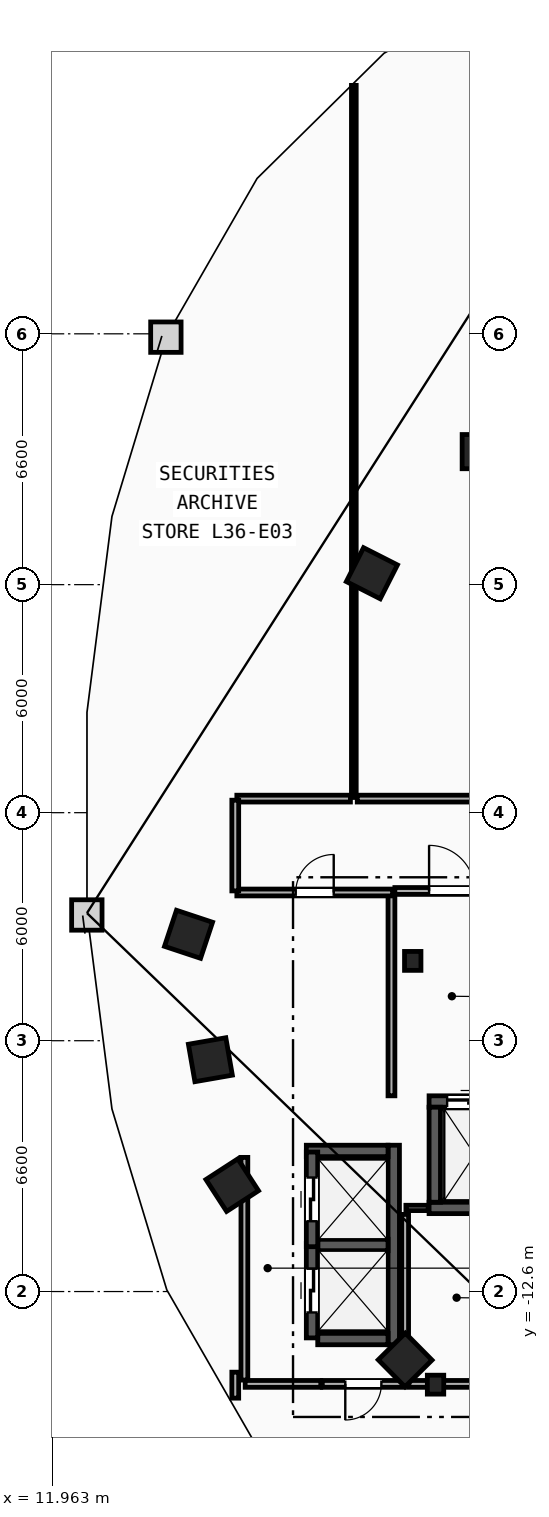
"""IFC4 building model, lengths in metres.
Left out: names, types, materials, properties, quantities, classifications, styles, units other than length and angle.
Written with IfcOpenShell. Run it as: python <this file> out.ifc"""

import sys

from ifc_helpers import new_model, si_unit, direction, frame, frame_2d, origin, origin_2d, place, context, subcontext, project, spatial, rectangle, i_section, extrude, element, fill, save


model = new_model("IFC4")
c1 = context("Model", 3, precision=1e-05, world=origin(), true_north=direction((0.0, 1.0)))
c2 = subcontext(c1, "Body", "Model", "MODEL_VIEW")
j1 = project(units=[si_unit("LENGTHUNIT", "METRE"), si_unit("PLANEANGLEUNIT", "RADIAN")], contexts=[c1])
p1 = place(None, origin())
s1 = spatial("IfcSite", under=j1, at=p1, CompositionType="ELEMENT")
p2 = place(p1, origin())
s2 = spatial("IfcBuilding", under=s1, at=p2, CompositionType="ELEMENT")
p3 = place(p2, frame((0.0, 0.0, 140.4)))
s3 = spatial("IfcBuildingStorey", under=s2, at=p3, CompositionType="ELEMENT", Elevation=140.4)
for number, where, z_axis, x_axis in (
    (1, (21.45, -3.9, 0.0), (0.0, 0.0, 1.0), (1.0, 0.0, 0.0)),
    (2, (22.05, -15.05, 0.0), (0.0, 0.0, 1.0), (1.0, 0.0, 0.0)),
):
    element("IfcColumn", number, at=place(p3, frame(where, z_axis=z_axis, x_axis=x_axis)), inside=s3, PredefinedType="COLUMN", context=c2, shape_type="SweptSolid", body=[
        extrude(i_section(OverallWidth=0.432, OverallDepth=0.498, WebThickness=0.056, FlangeThickness=0.089, FilletRadius=0.018, at=origin_2d()), origin(), (0.0, 0.0, 1.0), 3.6),
    ])
p4 = place(p3, frame((23.2, 9.5, 0.0), z_axis=(0.0, 0.0, 1.0), x_axis=(1.0, 0.0, 0.0)))
e3 = element("IfcColumn", 3, at=p4, inside=s3, PredefinedType="COLUMN", context=c2, shape_type="SweptSolid", body=[
    extrude(rectangle(XDim=0.9, YDim=0.9, at=origin_2d()), origin(), (0.0, 0.0, 1.0), 3.6),
])
for number, where, z_axis, x_axis in (
    (4, (15.55, -3.2, 0.0), (0.0, 0.0, 1.0), (-0.315, -0.949, 0.0)),
    (5, (16.125, -6.5, 0.0), (0.0, 0.0, 1.0), (0.172, -0.985, 0.0)),
    (6, (16.7, -9.8, 0.0), (0.0, 0.0, 1.0), (0.544, -0.839, 0.0)),
    (7, (21.25, -14.4, 0.0), (0.0, 0.0, 1.0), (0.703, -0.711, 0.0)),
    (8, (20.375, 6.3, 0.0), (0.0, 0.0, 1.0), (-0.453, -0.892, 0.0)),
):
    element("IfcColumn", number, at=place(p3, frame(where, z_axis=z_axis, x_axis=x_axis)), inside=s3, PredefinedType="COLUMN", context=c2, shape_type="SweptSolid", body=[
        extrude(rectangle(XDim=1.0, YDim=1.0, at=origin_2d()), origin(), (0.0, 0.0, 1.0), 3.6),
    ])
p5 = place(p3, frame((20.89, -7.45, 0.0), z_axis=(0.0, 0.0, 1.0), x_axis=(0.0, 1.0, 0.0)))
e9 = element("IfcWall", 9, at=p5, inside=s3, PredefinedType="PARTITIONING", context=c2, shape_type="SweptSolid", body=[
    extrude(rectangle(XDim=5.3, YDim=0.18, at=frame_2d((2.65, 0.0))), origin(), (0.0, 0.0, 1.0), 3.36),
])
p6 = place(p3, frame((20.98, -2.06, 0.0), z_axis=(0.0, 0.0, 1.0), x_axis=(1.0, 0.0, 0.0)))
e10 = element("IfcWall", 10, at=p6, inside=s3, PredefinedType="PARTITIONING", context=c2, shape_type="SweptSolid", body=[
    extrude(rectangle(XDim=3.0, YDim=0.18, at=frame_2d((1.5, 0.0))), origin(), (0.0, 0.0, 1.0), 3.36),
])
p7 = place(p6, frame((0.9, 0.0, 0.0)))
e11 = element("IfcOpeningElement", 11, at=p7, cuts=e10, PredefinedType="OPENING", context=c2, shape_type="SweptSolid", body=[
    extrude(rectangle(XDim=1.2, YDim=2.15, at=frame_2d((0.6, 1.075))), frame((0.0, 0.1, 0.0), z_axis=(0.0, -1.0, 0.0), x_axis=(1.0, 0.0, 0.0)), (0.0, 0.0, 1.0), 0.2),
])
p8 = place(p3, frame((21.88, -7.6, 0.0), z_axis=(0.0, 0.0, 1.0), x_axis=(1.0, 0.0, 0.0)))
e12 = element("IfcWall", 12, at=p8, inside=s3, PredefinedType="SHEAR", context=c2, shape_type="SweptSolid", body=[
    extrude(rectangle(XDim=2.1, YDim=0.3, at=frame_2d((1.05, 0.0))), origin(), (0.0, 0.0, 1.0), 3.36),
])
p9 = place(p8, frame((0.475, 0.0, 0.0)))
e13 = element("IfcOpeningElement", 13, at=p9, cuts=e12, PredefinedType="OPENING", context=c2, shape_type="SweptSolid", body=[
    extrude(rectangle(XDim=1.15, YDim=2.2, at=frame_2d((0.575, 1.1))), frame((0.0, 0.16, 0.0), z_axis=(0.0, -1.0, 0.0), x_axis=(1.0, 0.0, 0.0)), (0.0, 0.0, 1.0), 0.32),
])
p10 = place(p3, frame((21.88, -10.4, 0.0), z_axis=(0.0, 0.0, 1.0), x_axis=(1.0, 0.0, 0.0)))
e14 = element("IfcWall", 14, at=p10, inside=s3, PredefinedType="SHEAR", context=c2, shape_type="SweptSolid", body=[
    extrude(rectangle(XDim=2.1, YDim=0.3, at=frame_2d((1.05, 0.0))), origin(), (0.0, 0.0, 1.0), 3.36),
])
p11 = place(p3, frame((22.03, -10.25, 0.0), z_axis=(0.0, 0.0, 1.0), x_axis=(0.0, 1.0, 0.0)))
e15 = element("IfcWall", 15, at=p11, inside=s3, PredefinedType="SHEAR", context=c2, shape_type="SweptSolid", body=[
    extrude(rectangle(XDim=2.5, YDim=0.3, at=frame_2d((1.25, 0.0))), origin(), (0.0, 0.0, 1.0), 3.36),
])
p12 = place(p3, frame((20.95, -14.0, 0.0), z_axis=(0.0, 0.0, 1.0), x_axis=(0.0, 1.0, 0.0)))
e16 = element("IfcWall", 16, at=p12, inside=s3, PredefinedType="SHEAR", context=c2, shape_type="SweptSolid", body=[
    extrude(rectangle(XDim=5.25, YDim=0.3, at=frame_2d((2.625, 0.0))), origin(), (0.0, 0.0, 1.0), 3.36),
])
p13 = place(p3, frame((18.95, -13.85, 0.0), z_axis=(0.0, 0.0, 1.0), x_axis=(1.0, 0.0, 0.0)))
e17 = element("IfcWall", 17, at=p13, inside=s3, PredefinedType="SHEAR", context=c2, shape_type="SweptSolid", body=[
    extrude(rectangle(XDim=1.85, YDim=0.3, at=frame_2d((0.925, 0.0))), origin(), (0.0, 0.0, 1.0), 3.36),
])
p14 = place(p3, frame((18.65, -8.9, 0.0), z_axis=(0.0, 0.0, 1.0), x_axis=(1.0, 0.0, 0.0)))
e18 = element("IfcWall", 18, at=p14, inside=s3, PredefinedType="SHEAR", context=c2, shape_type="SweptSolid", body=[
    extrude(rectangle(XDim=2.15, YDim=0.3, at=frame_2d((1.075, 0.0))), origin(), (0.0, 0.0, 1.0), 3.36),
])
p15 = place(p3, frame((18.95, -11.375, 0.0), z_axis=(0.0, 0.0, 1.0), x_axis=(1.0, 0.0, 0.0)))
e19 = element("IfcWall", 19, at=p15, inside=s3, PredefinedType="SHEAR", context=c2, shape_type="SweptSolid", body=[
    extrude(rectangle(XDim=1.85, YDim=0.3, at=frame_2d((0.925, 0.0))), origin(), (0.0, 0.0, 1.0), 3.36),
])
p16 = place(p3, frame((18.8, -13.82, 0.0), z_axis=(0.0, 0.0, 1.0), x_axis=(0.0, 1.0, 0.0)))
e20 = element("IfcWall", 20, at=p16, inside=s3, PredefinedType="SHEAR", context=c2, shape_type="SweptSolid", body=[
    extrude(rectangle(XDim=2.49, YDim=0.3, at=frame_2d((1.245, 0.0))), origin(), (0.0, 0.0, 1.0), 3.36),
])
p17 = place(p16, frame((0.67, 0.0, 0.0)))
e21 = element("IfcOpeningElement", 21, at=p17, cuts=e20, PredefinedType="OPENING", context=c2, shape_type="SweptSolid", body=[
    extrude(rectangle(XDim=1.15, YDim=2.2, at=frame_2d((0.575, 1.1))), frame((0.0, 0.16, 0.0), z_axis=(0.0, -1.0, 0.0), x_axis=(1.0, 0.0, 0.0)), (0.0, 0.0, 1.0), 0.32),
])
p18 = place(p3, frame((18.8, -11.42, 0.0), z_axis=(0.0, 0.0, 1.0), x_axis=(0.0, 1.0, 0.0)))
e22 = element("IfcWall", 22, at=p18, inside=s3, PredefinedType="SHEAR", context=c2, shape_type="SweptSolid", body=[
    extrude(rectangle(XDim=2.49, YDim=0.3, at=frame_2d((1.245, 0.0))), origin(), (0.0, 0.0, 1.0), 3.36),
])
p19 = place(p18, frame((0.67, 0.0, 0.0)))
e23 = element("IfcOpeningElement", 23, at=p19, cuts=e22, PredefinedType="OPENING", context=c2, shape_type="SweptSolid", body=[
    extrude(rectangle(XDim=1.15, YDim=2.2, at=frame_2d((0.575, 1.1))), frame((0.0, 0.16, 0.0), z_axis=(0.0, -1.0, 0.0), x_axis=(1.0, 0.0, 0.0)), (0.0, 0.0, 1.0), 0.32),
])
p20 = place(p3, frame((17.02, -14.93, 0.0), z_axis=(0.0, 0.0, 1.0), x_axis=(0.0, 1.0, 0.0)))
e24 = element("IfcWall", 24, at=p20, inside=s3, PredefinedType="PARTITIONING", context=c2, shape_type="SweptSolid", body=[
    extrude(rectangle(XDim=5.86, YDim=0.18, at=frame_2d((2.93, 0.0))), origin(), (0.0, 0.0, 1.0), 3.36),
])
p21 = place(p3, frame((17.04, -15.03, 0.0), z_axis=(0.0, 0.0, 1.0), x_axis=(1.0, 0.0, 0.0)))
e25 = element("IfcWall", 25, at=p21, inside=s3, PredefinedType="PARTITIONING", context=c2, shape_type="SweptSolid", body=[
    extrude(rectangle(XDim=1.99, YDim=0.18, at=frame_2d((0.995, 0.0))), origin(), (0.0, 0.0, 1.0), 3.36),
])
p22 = place(p3, frame((21.23, -15.03, 0.0), z_axis=(0.0, 0.0, 1.0), x_axis=(-1.0, 0.0, 0.0)))
e26 = element("IfcWall", 26, at=p22, inside=s3, PredefinedType="PARTITIONING", context=c2, shape_type="SweptSolid", body=[
    extrude(rectangle(XDim=2.16, YDim=0.18, at=frame_2d((1.08, 0.0))), origin(), (0.0, 0.0, 1.0), 3.36),
])
p23 = place(p22, frame((0.605, 0.0, 0.0)))
e27 = element("IfcOpeningElement", 27, at=p23, cuts=e26, PredefinedType="OPENING", context=c2, shape_type="SweptSolid", body=[
    extrude(rectangle(XDim=0.95, YDim=2.1, at=frame_2d((0.475, 1.05))), frame((0.0, 0.1, 0.0), z_axis=(0.0, -1.0, 0.0), x_axis=(1.0, 0.0, 0.0)), (0.0, 0.0, 1.0), 0.2),
])
p24 = place(p3, frame((21.27, -10.4, 0.0), z_axis=(0.0, 0.0, 1.0), x_axis=(1.0, 0.0, 0.0)))
e28 = element("IfcWall", 28, at=p24, inside=s3, PredefinedType="PARTITIONING", context=c2, shape_type="SweptSolid", body=[
    extrude(rectangle(XDim=0.59, YDim=0.14, at=frame_2d((0.295, 0.0))), origin(), (0.0, 0.0, 1.0), 3.36),
])
p25 = place(p3, frame((21.25, -14.93, 0.0), z_axis=(0.0, 0.0, 1.0), x_axis=(0.0, 1.0, 0.0)))
e29 = element("IfcWall", 29, at=p25, inside=s3, PredefinedType="PARTITIONING", context=c2, shape_type="SweptSolid", body=[
    extrude(rectangle(XDim=4.36, YDim=0.18, at=frame_2d((2.18, 0.0))), origin(), (0.0, 0.0, 1.0), 3.36),
])
p26 = place(p3, frame((21.35, -15.03, 0.0), z_axis=(0.0, 0.0, 1.0), x_axis=(1.0, 0.0, 0.0)))
e30 = element("IfcWall", 30, at=p26, inside=s3, PredefinedType="PARTITIONING", context=c2, shape_type="SweptSolid", body=[
    extrude(rectangle(XDim=2.61, YDim=0.18, at=frame_2d((1.305, 0.0))), origin(), (0.0, 0.0, 1.0), 2.433),
])
p27 = place(p3, frame((19.9, 0.4, 0.0), z_axis=(0.0, 0.0, 1.0), x_axis=(0.0, 1.0, 0.0)))
e31 = element("IfcWall", 31, at=p27, inside=s3, PredefinedType="PARTITIONING", context=c2, shape_type="SweptSolid", body=[
    extrude(rectangle(XDim=18.737, YDim=0.125, at=frame_2d((9.368, 0.0))), origin(), (0.0, 0.0, 1.0), 3.36),
])
p28 = place(p3, frame((16.822, -2.1, 0.0), z_axis=(0.0, 0.0, 1.0), x_axis=(1.0, 0.0, 0.0)))
e32 = element("IfcWall", 32, at=p28, inside=s3, PredefinedType="PARTITIONING", context=c2, shape_type="SweptSolid", body=[
    extrude(rectangle(XDim=4.098, YDim=0.18, at=frame_2d((2.049, 0.0))), origin(), (0.0, 0.0, 1.0), 3.36),
])
p29 = place(p28, frame((1.549, 0.0, 0.0)))
e33 = element("IfcOpeningElement", 33, at=p29, cuts=e32, PredefinedType="OPENING", context=c2, shape_type="SweptSolid", body=[
    extrude(rectangle(XDim=1.0, YDim=2.15, at=frame_2d((0.5, 1.075))), frame((0.0, 0.1, 0.0), z_axis=(0.0, -1.0, 0.0), x_axis=(1.0, 0.0, 0.0)), (0.0, 0.0, 1.0), 0.2),
])
p30 = place(p3, frame((19.81, 0.37, 0.0), z_axis=(0.0, 0.0, 1.0), x_axis=(-1.0, 0.0, 0.0)))
e34 = element("IfcWall", 34, at=p30, inside=s3, PredefinedType="PARTITIONING", context=c2, shape_type="SweptSolid", body=[
    extrude(rectangle(XDim=2.989, YDim=0.18, at=frame_2d((1.494, 0.0))), origin(), (0.0, 0.0, 1.0), 3.36),
])
p31 = place(p3, frame((16.78, 0.329, 0.0), z_axis=(0.0, 0.0, 1.0), x_axis=(0.0, -1.0, 0.0)))
e35 = element("IfcWall", 35, at=p31, inside=s3, PredefinedType="PARTITIONING", context=c2, shape_type="SweptSolid", body=[
    extrude(rectangle(XDim=2.387, YDim=0.18, at=frame_2d((1.194, 0.0))), origin(), (0.0, 0.0, 1.0), 3.36),
])
p32 = place(p3, frame((16.78, -14.721, 0.0), z_axis=(0.0, 0.0, 1.0), x_axis=(0.0, -1.0, 0.0)))
e36 = element("IfcWall", 36, at=p32, inside=s3, PredefinedType="PARTITIONING", context=c2, shape_type="SweptSolid", body=[
    extrude(rectangle(XDim=0.684, YDim=0.18, at=frame_2d((0.342, 0.0))), origin(), (0.0, 0.0, 1.0), 3.36),
])
p33 = place(p3, frame((25.4, 0.37, 0.0), z_axis=(0.0, 0.0, 1.0), x_axis=(-1.0, 0.0, 0.0)))
e37 = element("IfcWall", 37, at=p33, inside=s3, PredefinedType="PARTITIONING", context=c2, shape_type="SweptSolid", body=[
    extrude(rectangle(XDim=5.41, YDim=0.18, at=frame_2d((2.705, 0.0))), origin(), (0.0, 0.0, 1.0), 3.36),
])
p34 = place(p7, origin())
e38 = element("IfcDoor", 38, at=p34, inside=s3, OperationType="SINGLE_SWING_LEFT", PredefinedType="DOOR", context=c2, shape_type="SweptSolid", body=[
    extrude(rectangle(XDim=1.2, YDim=2.15, at=frame_2d((0.6, 1.075))), frame((0.0, 0.025, 0.0), z_axis=(0.0, -1.0, 0.0), x_axis=(1.0, 0.0, 0.0)), (0.0, 0.0, 1.0), 0.05),
])
fill(e11, e38)
p35 = place(p9, origin())
e39 = element("IfcDoor", 39, at=p35, inside=s3, OperationType="SLIDING_TO_LEFT", PredefinedType="TRAPDOOR", context=c2, shape_type="SweptSolid", body=[
    extrude(rectangle(XDim=1.15, YDim=2.2, at=frame_2d((0.575, 1.1))), frame((0.0, 0.025, 0.0), z_axis=(0.0, -1.0, 0.0), x_axis=(1.0, 0.0, 0.0)), (0.0, 0.0, 1.0), 0.05),
])
fill(e13, e39)
p36 = place(p17, origin())
e40 = element("IfcDoor", 40, at=p36, inside=s3, OperationType="SLIDING_TO_LEFT", PredefinedType="TRAPDOOR", context=c2, shape_type="SweptSolid", body=[
    extrude(rectangle(XDim=1.15, YDim=2.2, at=frame_2d((0.575, 1.1))), frame((0.0, 0.025, 0.0), z_axis=(0.0, -1.0, 0.0), x_axis=(1.0, 0.0, 0.0)), (0.0, 0.0, 1.0), 0.05),
])
fill(e21, e40)
p37 = place(p19, origin())
e41 = element("IfcDoor", 41, at=p37, inside=s3, OperationType="SLIDING_TO_LEFT", PredefinedType="TRAPDOOR", context=c2, shape_type="SweptSolid", body=[
    extrude(rectangle(XDim=1.15, YDim=2.2, at=frame_2d((0.575, 1.1))), frame((0.0, 0.025, 0.0), z_axis=(0.0, -1.0, 0.0), x_axis=(1.0, 0.0, 0.0)), (0.0, 0.0, 1.0), 0.05),
])
fill(e23, e41)
p38 = place(p29, origin())
e42 = element("IfcDoor", 42, at=p38, inside=s3, OperationType="SINGLE_SWING_RIGHT", PredefinedType="DOOR", context=c2, shape_type="SweptSolid", body=[
    extrude(rectangle(XDim=1.0, YDim=2.15, at=frame_2d((0.5, 1.075))), frame((0.0, 0.025, 0.0), z_axis=(0.0, -1.0, 0.0), x_axis=(1.0, 0.0, 0.0)), (0.0, 0.0, 1.0), 0.05),
])
fill(e33, e42)
p39 = place(p23, origin())
e43 = element("IfcDoor", 43, at=p39, inside=s3, OperationType="SINGLE_SWING_RIGHT", PredefinedType="DOOR", context=c2, shape_type="SweptSolid", body=[
    extrude(rectangle(XDim=0.95, YDim=2.1, at=frame_2d((0.475, 1.05))), frame((0.0, 0.025, 0.0), z_axis=(0.0, -1.0, 0.0), x_axis=(1.0, 0.0, 0.0)), (0.0, 0.0, 1.0), 0.05),
])
fill(e27, e43)
save(model, sys.argv[1])
